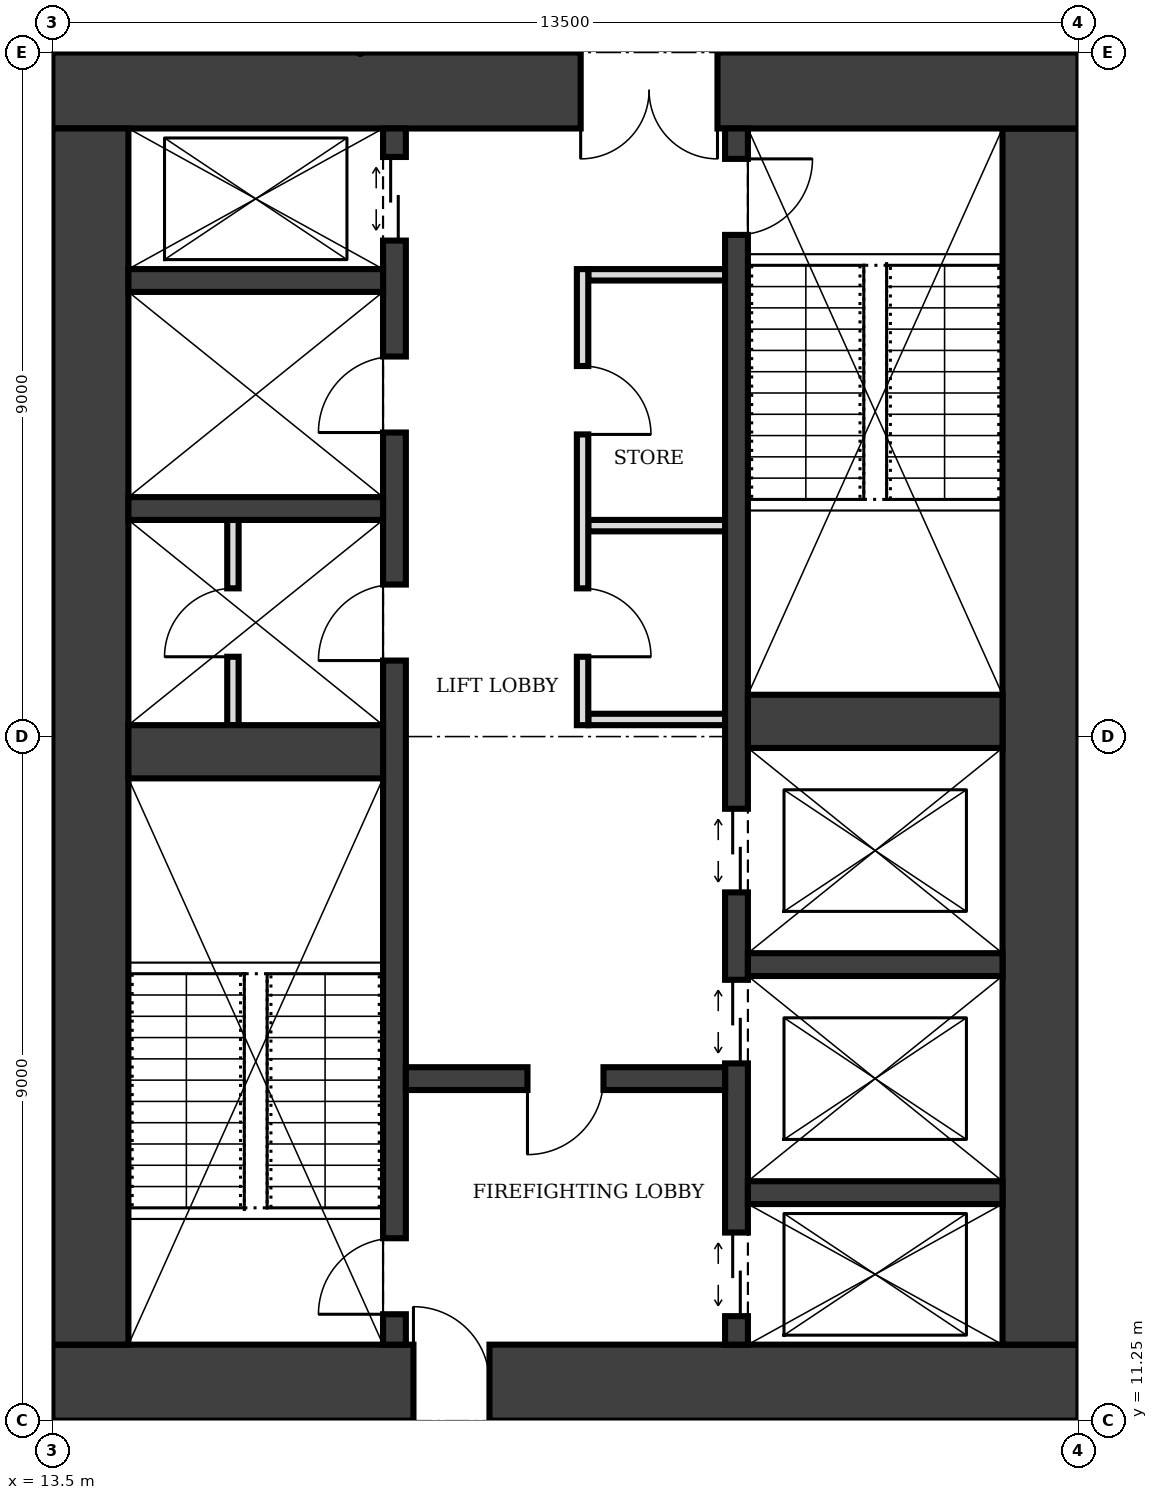
"""IFC4 building model, lengths in metres.
Left out: names, types, materials, properties, quantities, classifications, styles, units other than length and angle.
Written with IfcOpenShell. Run it as: python <this file> out.ifc"""

import sys

from ifc_helpers import new_model, si_unit, direction, frame, frame_2d, origin, place, context, subcontext, project, spatial, rectangle, extrude, element, fill, save


model = new_model("IFC4")
c1 = context("Model", 3, precision=1e-05, world=origin(), true_north=direction((0.0, 1.0)))
c2 = subcontext(c1, "Body", "Model", "MODEL_VIEW")
j1 = project(units=[si_unit("LENGTHUNIT", "METRE"), si_unit("PLANEANGLEUNIT", "RADIAN")], contexts=[c1])
p1 = place(None, origin())
s1 = spatial("IfcSite", under=j1, at=p1, CompositionType="ELEMENT")
p2 = place(p1, origin())
s2 = spatial("IfcBuilding", under=s1, at=p2, CompositionType="ELEMENT")
p3 = place(p2, frame((0.0, 0.0, 117.0)))
s3 = spatial("IfcBuildingStorey", under=s2, at=p3, CompositionType="ELEMENT", Elevation=117.0)
p4 = place(p3, frame((13.5, 11.75, 0.0), z_axis=(0.0, 0.0, 1.0), x_axis=(1.0, 0.0, 0.0)))
e1 = element("IfcWall", 1, at=p4, inside=s3, PredefinedType="SHEAR", context=c2, shape_type="SweptSolid", body=[
    extrude(rectangle(XDim=13.5, YDim=1.0, at=frame_2d((6.75, 0.0))), origin(), (0.0, 0.0, 1.0), 4.0),
])
p5 = place(p4, frame((4.75, 0.0, 0.0)))
e2 = element("IfcOpeningElement", 2, at=p5, cuts=e1, PredefinedType="OPENING", context=c2, shape_type="SweptSolid", body=[
    extrude(rectangle(XDim=1.0, YDim=2.1, at=frame_2d((0.5, 1.05))), frame((0.0, 0.51, 0.0), z_axis=(0.0, -1.0, 0.0), x_axis=(1.0, 0.0, 0.0)), (0.0, 0.0, 1.0), 1.02),
])
p6 = place(p3, frame((26.5, 12.25, 0.0), z_axis=(0.0, 0.0, 1.0), x_axis=(0.0, 1.0, 0.0)))
e3 = element("IfcWall", 3, at=p6, inside=s3, PredefinedType="SHEAR", context=c2, shape_type="SweptSolid", body=[
    extrude(rectangle(XDim=16.0, YDim=1.0, at=frame_2d((8.0, 0.0))), origin(), (0.0, 0.0, 1.0), 4.0),
])
p7 = place(p3, frame((27.0, 28.75, 0.0), z_axis=(0.0, 0.0, 1.0), x_axis=(-1.0, 0.0, 0.0)))
e4 = element("IfcWall", 4, at=p7, inside=s3, PredefinedType="SHEAR", context=c2, shape_type="SweptSolid", body=[
    extrude(rectangle(XDim=13.5, YDim=1.0, at=frame_2d((6.75, 0.0))), origin(), (0.0, 0.0, 1.0), 4.0),
])
p8 = place(p7, frame((4.75, 0.0, 0.0)))
e5 = element("IfcOpeningElement", 5, at=p8, cuts=e4, PredefinedType="OPENING", context=c2, shape_type="SweptSolid", body=[
    extrude(rectangle(XDim=1.8, YDim=2.1, at=frame_2d((0.9, 1.05))), frame((0.0, 0.51, 0.0), z_axis=(0.0, -1.0, 0.0), x_axis=(1.0, 0.0, 0.0)), (0.0, 0.0, 1.0), 1.02),
])
p9 = place(p3, frame((14.0, 28.25, 0.0), z_axis=(0.0, 0.0, 1.0), x_axis=(0.0, -1.0, 0.0)))
e6 = element("IfcWall", 6, at=p9, inside=s3, PredefinedType="SHEAR", context=c2, shape_type="SweptSolid", body=[
    extrude(rectangle(XDim=16.0, YDim=1.0, at=frame_2d((8.0, 0.0))), origin(), (0.0, 0.0, 1.0), 4.0),
])
p10 = place(p3, frame((18.0, 12.25, 0.0), z_axis=(0.0, 0.0, 1.0), x_axis=(0.0, 1.0, 0.0)))
e7 = element("IfcWall", 7, at=p10, inside=s3, PredefinedType="SHEAR", context=c2, shape_type="SweptSolid", body=[
    extrude(rectangle(XDim=16.0, YDim=0.3, at=frame_2d((8.0, 0.0))), origin(), (0.0, 0.0, 1.0), 4.0),
])
p11 = place(p10, frame((0.4, 0.0, 0.0)))
e8 = element("IfcOpeningElement", 8, at=p11, cuts=e7, PredefinedType="OPENING", context=c2, shape_type="SweptSolid", body=[
    extrude(rectangle(XDim=1.0, YDim=2.1, at=frame_2d((0.5, 1.05))), frame((0.0, 0.16, 0.0), z_axis=(0.0, -1.0, 0.0), x_axis=(1.0, 0.0, 0.0)), (0.0, 0.0, 1.0), 0.32),
])
p12 = place(p10, frame((14.525, 0.0, 0.0)))
e9 = element("IfcOpeningElement", 9, at=p12, cuts=e7, PredefinedType="OPENING", context=c2, shape_type="SweptSolid", body=[
    extrude(rectangle(XDim=1.1, YDim=2.1, at=frame_2d((0.55, 1.05))), frame((0.0, 0.16, 0.0), z_axis=(0.0, -1.0, 0.0), x_axis=(1.0, 0.0, 0.0)), (0.0, 0.0, 1.0), 0.32),
])
p13 = place(p10, frame((9.0, 0.0, 0.0)))
e10 = element("IfcOpeningElement", 10, at=p13, cuts=e7, PredefinedType="OPENING", context=c2, shape_type="SweptSolid", body=[
    extrude(rectangle(XDim=1.0, YDim=2.1, at=frame_2d((0.5, 1.05))), frame((0.0, 0.16, 0.0), z_axis=(0.0, -1.0, 0.0), x_axis=(1.0, 0.0, 0.0)), (0.0, 0.0, 1.0), 0.32),
])
p14 = place(p10, frame((12.0, 0.0, 0.0)))
e11 = element("IfcOpeningElement", 11, at=p14, cuts=e7, PredefinedType="OPENING", context=c2, shape_type="SweptSolid", body=[
    extrude(rectangle(XDim=1.0, YDim=2.1, at=frame_2d((0.5, 1.05))), frame((0.0, 0.16, 0.0), z_axis=(0.0, -1.0, 0.0), x_axis=(1.0, 0.0, 0.0)), (0.0, 0.0, 1.0), 0.32),
])
p15 = place(p3, frame((22.5, 12.25, 0.0), z_axis=(0.0, 0.0, 1.0), x_axis=(0.0, 1.0, 0.0)))
e12 = element("IfcWall", 12, at=p15, inside=s3, PredefinedType="SHEAR", context=c2, shape_type="SweptSolid", body=[
    extrude(rectangle(XDim=16.0, YDim=0.3, at=frame_2d((8.0, 0.0))), origin(), (0.0, 0.0, 1.0), 4.0),
])
p16 = place(p15, frame((14.6, 0.0, 0.0)))
e13 = element("IfcOpeningElement", 13, at=p16, cuts=e12, PredefinedType="OPENING", context=c2, shape_type="SweptSolid", body=[
    extrude(rectangle(XDim=1.0, YDim=2.1, at=frame_2d((0.5, 1.05))), frame((0.0, 0.16, 0.0), z_axis=(0.0, -1.0, 0.0), x_axis=(1.0, 0.0, 0.0)), (0.0, 0.0, 1.0), 0.32),
])
p17 = place(p15, frame((0.375, 0.0, 0.0)))
e14 = element("IfcOpeningElement", 14, at=p17, cuts=e12, PredefinedType="OPENING", context=c2, shape_type="SweptSolid", body=[
    extrude(rectangle(XDim=1.1, YDim=2.1, at=frame_2d((0.55, 1.05))), frame((0.0, 0.16, 0.0), z_axis=(0.0, -1.0, 0.0), x_axis=(1.0, 0.0, 0.0)), (0.0, 0.0, 1.0), 0.32),
])
p18 = place(p15, frame((3.7, 0.0, 0.0)))
e15 = element("IfcOpeningElement", 15, at=p18, cuts=e12, PredefinedType="OPENING", context=c2, shape_type="SweptSolid", body=[
    extrude(rectangle(XDim=1.1, YDim=2.1, at=frame_2d((0.55, 1.05))), frame((0.0, 0.16, 0.0), z_axis=(0.0, -1.0, 0.0), x_axis=(1.0, 0.0, 0.0)), (0.0, 0.0, 1.0), 0.32),
])
p19 = place(p15, frame((5.95, 0.0, 0.0)))
e16 = element("IfcOpeningElement", 16, at=p19, cuts=e12, PredefinedType="OPENING", context=c2, shape_type="SweptSolid", body=[
    extrude(rectangle(XDim=1.1, YDim=2.1, at=frame_2d((0.55, 1.05))), frame((0.0, 0.16, 0.0), z_axis=(0.0, -1.0, 0.0), x_axis=(1.0, 0.0, 0.0)), (0.0, 0.0, 1.0), 0.32),
])
p20 = place(p3, frame((14.5, 20.05, 0.0), z_axis=(0.0, 0.0, 1.0), x_axis=(1.0, 0.0, 0.0)))
e17 = element("IfcWall", 17, at=p20, inside=s3, PredefinedType="SHEAR", context=c2, shape_type="SweptSolid", body=[
    extrude(rectangle(XDim=3.35, YDim=0.7, at=frame_2d((1.675, 0.0))), origin(), (0.0, 0.0, 1.0), 4.0),
])
p21 = place(p3, frame((18.15, 15.75, 0.0), z_axis=(0.0, 0.0, 1.0), x_axis=(1.0, 0.0, 0.0)))
e18 = element("IfcWall", 18, at=p21, inside=s3, PredefinedType="SHEAR", context=c2, shape_type="SweptSolid", body=[
    extrude(rectangle(XDim=4.2, YDim=0.3, at=frame_2d((2.1, 0.0))), origin(), (0.0, 0.0, 1.0), 4.0),
])
p22 = place(p21, frame((1.6, 0.0, 0.0)))
e19 = element("IfcOpeningElement", 19, at=p22, cuts=e18, PredefinedType="OPENING", context=c2, shape_type="SweptSolid", body=[
    extrude(rectangle(XDim=1.0, YDim=2.1, at=frame_2d((0.5, 1.05))), frame((0.0, 0.16, 0.0), z_axis=(0.0, -1.0, 0.0), x_axis=(1.0, 0.0, 0.0)), (0.0, 0.0, 1.0), 0.32),
])
for number, where, z_axis, x_axis in (
    (20, (22.65, 14.25, 0.0), (0.0, 0.0, 1.0), (1.0, 0.0, 0.0)),
    (21, (22.65, 17.25, 0.0), (0.0, 0.0, 1.0), (1.0, 0.0, 0.0)),
):
    element("IfcWall", number, at=place(p3, frame(where, z_axis=z_axis, x_axis=x_axis)), inside=s3, PredefinedType="SHEAR", context=c2, shape_type="SweptSolid", body=[
        extrude(rectangle(XDim=3.35, YDim=0.3, at=frame_2d((1.675, 0.0))), origin(), (0.0, 0.0, 1.0), 4.0),
    ])
p23 = place(p3, frame((22.65, 20.45, 0.0), z_axis=(0.0, 0.0, 1.0), x_axis=(1.0, 0.0, 0.0)))
e22 = element("IfcWall", 22, at=p23, inside=s3, PredefinedType="SHEAR", context=c2, shape_type="SweptSolid", body=[
    extrude(rectangle(XDim=3.35, YDim=0.7, at=frame_2d((1.675, 0.0))), origin(), (0.0, 0.0, 1.0), 4.0),
])
for number, where, z_axis, x_axis in (
    (23, (14.5, 23.25, 0.0), (0.0, 0.0, 1.0), (1.0, 0.0, 0.0)),
    (24, (14.5, 26.25, 0.0), (0.0, 0.0, 1.0), (1.0, 0.0, 0.0)),
):
    element("IfcWall", number, at=place(p3, frame(where, z_axis=z_axis, x_axis=x_axis)), inside=s3, PredefinedType="SHEAR", context=c2, shape_type="SweptSolid", body=[
        extrude(rectangle(XDim=3.35, YDim=0.3, at=frame_2d((1.675, 0.0))), origin(), (0.0, 0.0, 1.0), 4.0),
    ])
p24 = place(p3, frame((20.475, 20.4, 0.0), z_axis=(0.0, 0.0, 1.0), x_axis=(0.0, 1.0, 0.0)))
e25 = element("IfcWall", 25, at=p24, inside=s3, PredefinedType="PARTITIONING", context=c2, shape_type="SweptSolid", body=[
    extrude(rectangle(XDim=6.0, YDim=0.15, at=frame_2d((3.0, 0.0))), origin(), (0.0, 0.0, 1.0), 3.75),
])
p25 = place(p24, frame((0.9, 0.0, 0.0)))
e26 = element("IfcOpeningElement", 26, at=p25, cuts=e25, PredefinedType="OPENING", context=c2, shape_type="SweptSolid", body=[
    extrude(rectangle(XDim=0.9, YDim=2.1, at=frame_2d((0.45, 1.05))), frame((0.0, 0.085, 0.0), z_axis=(0.0, -1.0, 0.0), x_axis=(1.0, 0.0, 0.0)), (0.0, 0.0, 1.0), 0.17),
])
p26 = place(p24, frame((3.825, 0.0, 0.0)))
e27 = element("IfcOpeningElement", 27, at=p26, cuts=e25, PredefinedType="OPENING", context=c2, shape_type="SweptSolid", body=[
    extrude(rectangle(XDim=0.9, YDim=2.1, at=frame_2d((0.45, 1.05))), frame((0.0, 0.085, 0.0), z_axis=(0.0, -1.0, 0.0), x_axis=(1.0, 0.0, 0.0)), (0.0, 0.0, 1.0), 0.17),
])
for number, where, z_axis, x_axis in (
    (28, (20.55, 20.475, 0.0), (0.0, 0.0, 1.0), (1.0, 0.0, 0.0)),
    (29, (20.55, 23.025, 0.0), (0.0, 0.0, 1.0), (1.0, 0.0, 0.0)),
    (30, (20.55, 26.325, 0.0), (0.0, 0.0, 1.0), (1.0, 0.0, 0.0)),
):
    element("IfcWall", number, at=place(p3, frame(where, z_axis=z_axis, x_axis=x_axis)), inside=s3, PredefinedType="PARTITIONING", context=c2, shape_type="SweptSolid", body=[
        extrude(rectangle(XDim=1.8, YDim=0.15, at=frame_2d((0.9, 0.0))), origin(), (0.0, 0.0, 1.0), 3.75),
    ])
p27 = place(p3, frame((15.875, 20.4, 0.0), z_axis=(0.0, 0.0, 1.0), x_axis=(0.0, 1.0, 0.0)))
e31 = element("IfcWall", 31, at=p27, inside=s3, PredefinedType="PARTITIONING", context=c2, shape_type="SweptSolid", body=[
    extrude(rectangle(XDim=2.7, YDim=0.15, at=frame_2d((1.35, 0.0))), origin(), (0.0, 0.0, 1.0), 3.75),
])
p28 = place(p27, frame((0.9, 0.0, 0.0)))
e32 = element("IfcOpeningElement", 32, at=p28, cuts=e31, PredefinedType="OPENING", context=c2, shape_type="SweptSolid", body=[
    extrude(rectangle(XDim=0.9, YDim=2.1, at=frame_2d((0.45, 1.05))), frame((0.0, 0.085, 0.0), z_axis=(0.0, -1.0, 0.0), x_axis=(1.0, 0.0, 0.0)), (0.0, 0.0, 1.0), 0.17),
])
p29 = place(p5, origin())
e33 = element("IfcDoor", 33, at=p29, inside=s3, OperationType="SINGLE_SWING_LEFT", PredefinedType="DOOR", context=c2, shape_type="SweptSolid", body=[
    extrude(rectangle(XDim=1.0, YDim=2.1, at=frame_2d((0.5, 1.05))), frame((0.0, 0.025, 0.0), z_axis=(0.0, -1.0, 0.0), x_axis=(1.0, 0.0, 0.0)), (0.0, 0.0, 1.0), 0.05),
])
fill(e2, e33)
p30 = place(p8, origin())
e34 = element("IfcDoor", 34, at=p30, inside=s3, OperationType="DOUBLE_DOOR_SINGLE_SWING", PredefinedType="DOOR", context=c2, shape_type="SweptSolid", body=[
    extrude(rectangle(XDim=1.8, YDim=2.1, at=frame_2d((0.9, 1.05))), frame((0.0, 0.025, 0.0), z_axis=(0.0, -1.0, 0.0), x_axis=(1.0, 0.0, 0.0)), (0.0, 0.0, 1.0), 0.05),
])
fill(e5, e34)
p31 = place(p22, frame((1.0, 0.0, 0.0), z_axis=(0.0, 0.0, 1.0), x_axis=(-1.0, 0.0, 0.0)))
e35 = element("IfcDoor", 35, at=p31, inside=s3, OperationType="SINGLE_SWING_RIGHT", PredefinedType="DOOR", context=c2, shape_type="SweptSolid", body=[
    extrude(rectangle(XDim=1.0, YDim=2.1, at=frame_2d((0.5, 1.05))), frame((0.0, 0.025, 0.0), z_axis=(0.0, -1.0, 0.0), x_axis=(1.0, 0.0, 0.0)), (0.0, 0.0, 1.0), 0.05),
])
fill(e19, e35)
p32 = place(p11, origin())
e36 = element("IfcDoor", 36, at=p32, inside=s3, OperationType="SINGLE_SWING_LEFT", PredefinedType="DOOR", context=c2, shape_type="SweptSolid", body=[
    extrude(rectangle(XDim=1.0, YDim=2.1, at=frame_2d((0.5, 1.05))), frame((0.0, 0.025, 0.0), z_axis=(0.0, -1.0, 0.0), x_axis=(1.0, 0.0, 0.0)), (0.0, 0.0, 1.0), 0.05),
])
fill(e8, e36)
p33 = place(p16, frame((1.0, 0.0, 0.0), z_axis=(0.0, 0.0, 1.0), x_axis=(-1.0, 0.0, 0.0)))
e37 = element("IfcDoor", 37, at=p33, inside=s3, OperationType="SINGLE_SWING_LEFT", PredefinedType="DOOR", context=c2, shape_type="SweptSolid", body=[
    extrude(rectangle(XDim=1.0, YDim=2.1, at=frame_2d((0.5, 1.05))), frame((0.0, 0.025, 0.0), z_axis=(0.0, -1.0, 0.0), x_axis=(1.0, 0.0, 0.0)), (0.0, 0.0, 1.0), 0.05),
])
fill(e13, e37)
p34 = place(p17, origin())
e38 = element("IfcDoor", 38, at=p34, inside=s3, OperationType="DOUBLE_DOOR_SLIDING", PredefinedType="DOOR", context=c2, shape_type="SweptSolid", body=[
    extrude(rectangle(XDim=1.1, YDim=2.1, at=frame_2d((0.55, 1.05))), frame((0.0, 0.025, 0.0), z_axis=(0.0, -1.0, 0.0), x_axis=(1.0, 0.0, 0.0)), (0.0, 0.0, 1.0), 0.05),
])
fill(e14, e38)
p35 = place(p12, origin())
e39 = element("IfcDoor", 39, at=p35, inside=s3, OperationType="DOUBLE_DOOR_SLIDING", PredefinedType="DOOR", context=c2, shape_type="SweptSolid", body=[
    extrude(rectangle(XDim=1.1, YDim=2.1, at=frame_2d((0.55, 1.05))), frame((0.0, 0.025, 0.0), z_axis=(0.0, -1.0, 0.0), x_axis=(1.0, 0.0, 0.0)), (0.0, 0.0, 1.0), 0.05),
])
fill(e9, e39)
p36 = place(p18, origin())
e40 = element("IfcDoor", 40, at=p36, inside=s3, OperationType="DOUBLE_DOOR_SLIDING", PredefinedType="DOOR", context=c2, shape_type="SweptSolid", body=[
    extrude(rectangle(XDim=1.1, YDim=2.1, at=frame_2d((0.55, 1.05))), frame((0.0, 0.025, 0.0), z_axis=(0.0, -1.0, 0.0), x_axis=(1.0, 0.0, 0.0)), (0.0, 0.0, 1.0), 0.05),
])
fill(e15, e40)
p37 = place(p19, origin())
e41 = element("IfcDoor", 41, at=p37, inside=s3, OperationType="DOUBLE_DOOR_SLIDING", PredefinedType="DOOR", context=c2, shape_type="SweptSolid", body=[
    extrude(rectangle(XDim=1.1, YDim=2.1, at=frame_2d((0.55, 1.05))), frame((0.0, 0.025, 0.0), z_axis=(0.0, -1.0, 0.0), x_axis=(1.0, 0.0, 0.0)), (0.0, 0.0, 1.0), 0.05),
])
fill(e16, e41)
p38 = place(p25, frame((0.9, 0.0, 0.0), z_axis=(0.0, 0.0, 1.0), x_axis=(-1.0, 0.0, 0.0)))
e42 = element("IfcDoor", 42, at=p38, inside=s3, OperationType="SINGLE_SWING_RIGHT", PredefinedType="DOOR", context=c2, shape_type="SweptSolid", body=[
    extrude(rectangle(XDim=0.9, YDim=2.1, at=frame_2d((0.45, 1.05))), frame((0.0, 0.025, 0.0), z_axis=(0.0, -1.0, 0.0), x_axis=(1.0, 0.0, 0.0)), (0.0, 0.0, 1.0), 0.05),
])
fill(e26, e42)
p39 = place(p26, frame((0.9, 0.0, 0.0), z_axis=(0.0, 0.0, 1.0), x_axis=(-1.0, 0.0, 0.0)))
e43 = element("IfcDoor", 43, at=p39, inside=s3, OperationType="SINGLE_SWING_RIGHT", PredefinedType="DOOR", context=c2, shape_type="SweptSolid", body=[
    extrude(rectangle(XDim=0.9, YDim=2.1, at=frame_2d((0.45, 1.05))), frame((0.0, 0.025, 0.0), z_axis=(0.0, -1.0, 0.0), x_axis=(1.0, 0.0, 0.0)), (0.0, 0.0, 1.0), 0.05),
])
fill(e27, e43)
p40 = place(p13, origin())
e44 = element("IfcDoor", 44, at=p40, inside=s3, OperationType="SINGLE_SWING_LEFT", PredefinedType="DOOR", context=c2, shape_type="SweptSolid", body=[
    extrude(rectangle(XDim=1.0, YDim=2.1, at=frame_2d((0.5, 1.05))), frame((0.0, 0.025, 0.0), z_axis=(0.0, -1.0, 0.0), x_axis=(1.0, 0.0, 0.0)), (0.0, 0.0, 1.0), 0.05),
])
fill(e10, e44)
p41 = place(p28, origin())
e45 = element("IfcDoor", 45, at=p41, inside=s3, OperationType="SINGLE_SWING_LEFT", PredefinedType="DOOR", context=c2, shape_type="SweptSolid", body=[
    extrude(rectangle(XDim=0.9, YDim=2.1, at=frame_2d((0.45, 1.05))), frame((0.0, 0.025, 0.0), z_axis=(0.0, -1.0, 0.0), x_axis=(1.0, 0.0, 0.0)), (0.0, 0.0, 1.0), 0.05),
])
fill(e32, e45)
p42 = place(p14, origin())
e46 = element("IfcDoor", 46, at=p42, inside=s3, OperationType="SINGLE_SWING_LEFT", PredefinedType="DOOR", context=c2, shape_type="SweptSolid", body=[
    extrude(rectangle(XDim=1.0, YDim=2.1, at=frame_2d((0.5, 1.05))), frame((0.0, 0.025, 0.0), z_axis=(0.0, -1.0, 0.0), x_axis=(1.0, 0.0, 0.0)), (0.0, 0.0, 1.0), 0.05),
])
fill(e11, e46)
save(model, sys.argv[1])
